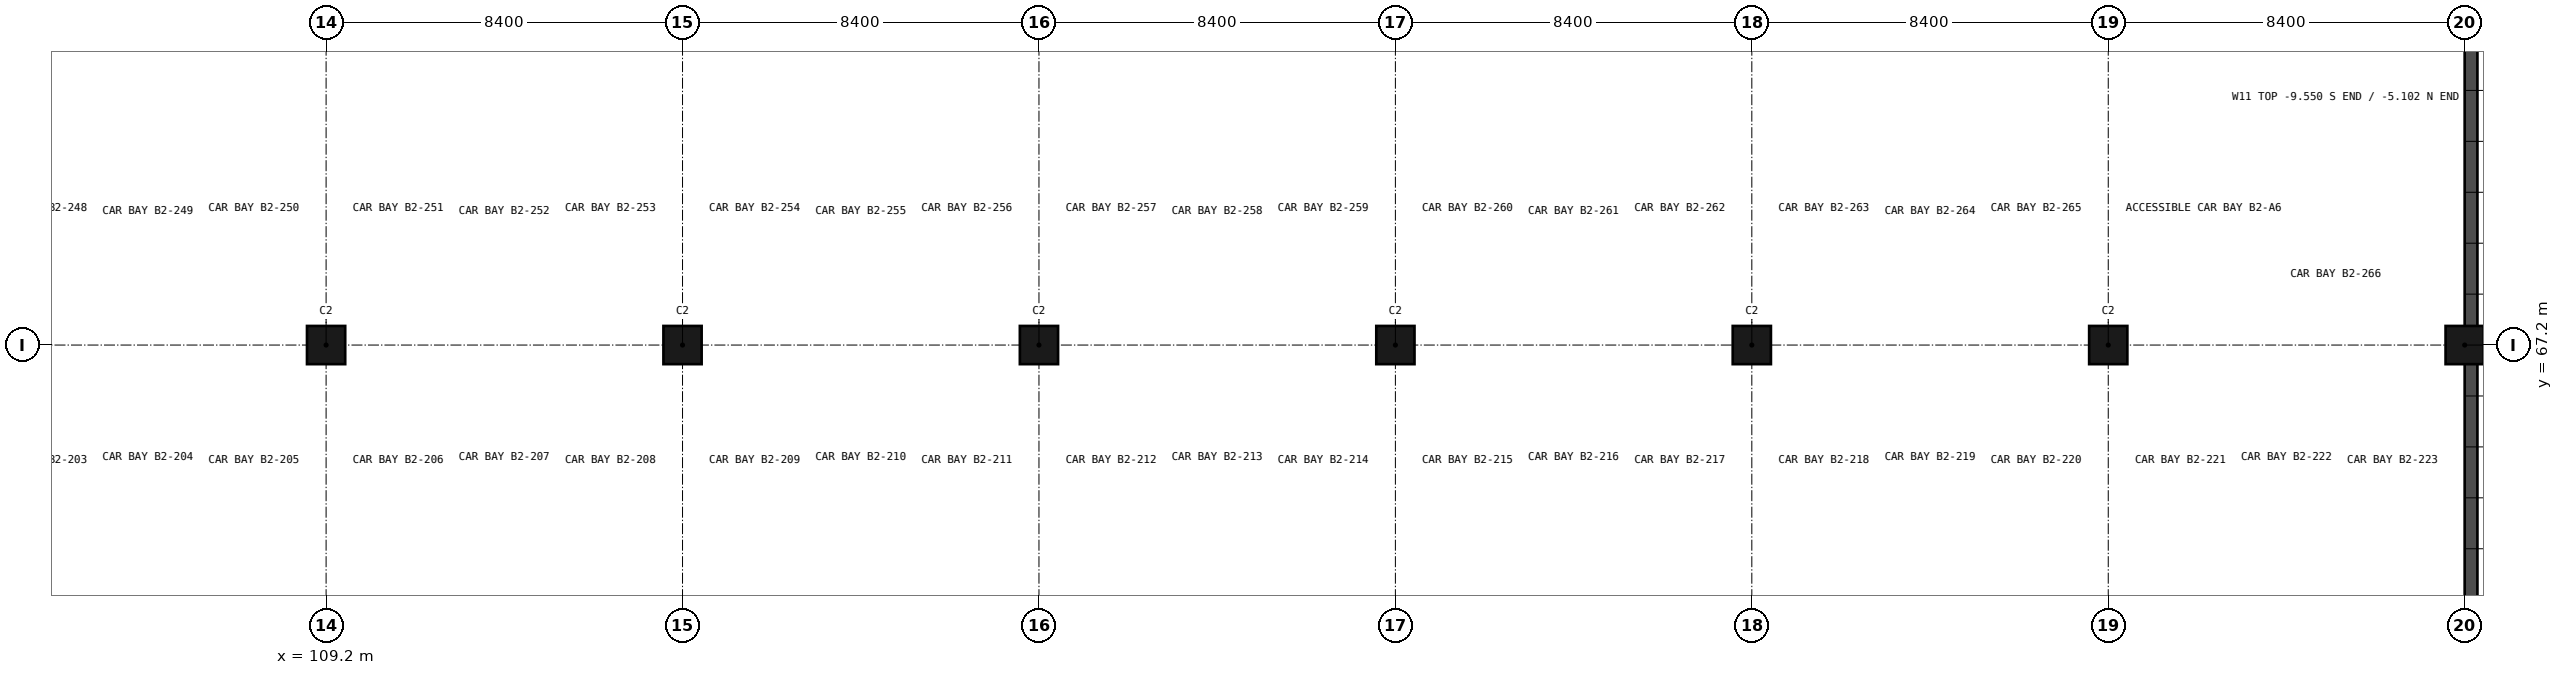
"""IFC4 building model, lengths in metres.
Left out: names, types, materials, properties, quantities, classifications, styles, units other than length and angle.
Written with IfcOpenShell. Run it as: python <this file> out.ifc"""

import sys

from ifc_helpers import new_model, si_unit, direction, frame, origin, origin_2d, place, context, subcontext, project, spatial, polyline, rectangle, outline, extrude, element, save


model = new_model("IFC4")
c1 = context("Model", 3, precision=1e-05, world=origin(), true_north=direction((0.0, 1.0)))
c2 = subcontext(c1, "Body", "Model", "MODEL_VIEW")
j1 = project(units=[si_unit("LENGTHUNIT", "METRE"), si_unit("PLANEANGLEUNIT", "RADIAN")], contexts=[c1])
p1 = place(None, origin())
s1 = spatial("IfcSite", under=j1, at=p1, CompositionType="ELEMENT")
p2 = place(p1, origin())
s2 = spatial("IfcBuilding", under=s1, at=p2, CompositionType="ELEMENT")
p3 = place(p2, frame((0.0, 0.0, -9.6)))
s3 = spatial("IfcBuildingStorey", under=s2, at=p3, CompositionType="ELEMENT", Elevation=-9.6)
for number, where, z_axis, x_axis in (
    (1, (109.2, 67.2, -0.25), (0.0, 0.0, 1.0), (1.0, 0.0, 0.0)),
    (2, (117.6, 67.2, -0.25), (0.0, 0.0, 1.0), (1.0, 0.0, 0.0)),
    (3, (126.0, 67.2, -0.25), (0.0, 0.0, 1.0), (1.0, 0.0, 0.0)),
    (4, (134.4, 67.2, -0.25), (0.0, 0.0, 1.0), (1.0, 0.0, 0.0)),
    (5, (142.8, 67.2, -0.25), (0.0, 0.0, 1.0), (1.0, 0.0, 0.0)),
    (6, (151.2, 67.2, -0.25), (0.0, 0.0, 1.0), (1.0, 0.0, 0.0)),
    (7, (159.6, 67.2, -0.25), (0.0, 0.0, 1.0), (1.0, 0.0, 0.0)),
):
    element("IfcColumn", number, at=place(p3, frame(where, z_axis=z_axis, x_axis=x_axis)), inside=s3, PredefinedType="COLUMN", context=c2, shape_type="SweptSolid", body=[
        extrude(rectangle(XDim=0.9, YDim=0.9, at=origin_2d()), origin(), (0.0, 0.0, 1.0), 4.75),
    ])
p4 = place(p3, frame((159.75, 53.219, 0.0), z_axis=(0.0, 0.0, 1.0), x_axis=(0.0, 1.0, 0.0)))
e8 = element("IfcWall", 8, at=p4, inside=s3, PredefinedType="SOLIDWALL", context=c2, shape_type="SweptSolid", body=[
    extrude(outline(polyline([(0.0, 0.0), (35.581, 0.0), (35.581, 4.498), (0.0, 0.05), (0.0, 0.0)])), frame((0.0, 0.15, 0.0), z_axis=(0.0, -1.0, 0.0), x_axis=(1.0, 0.0, 0.0)), (0.0, 0.0, 1.0), 0.3),
])
save(model, sys.argv[1])
